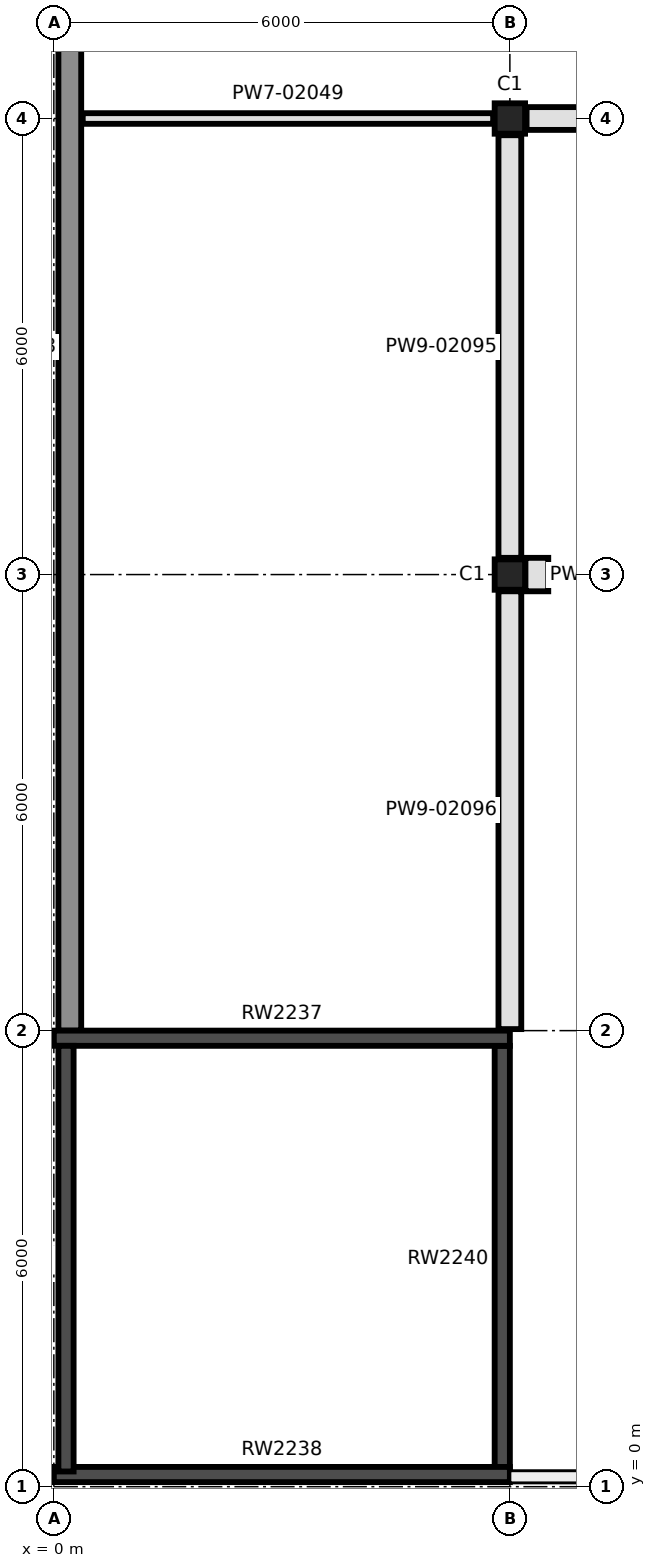
"""IFC4 building model, lengths in metres.
Left out: names, types, materials, properties, quantities, classifications, styles, units other than length and angle.
Written with IfcOpenShell. Run it as: python <this file> out.ifc"""

import sys

from ifc_helpers import new_model, si_unit, direction, frame, frame_2d, origin, origin_2d, place, context, subcontext, project, spatial, rectangle, extrude, element, fill, save


model = new_model("IFC4")
c1 = context("Model", 3, precision=1e-05, world=origin(), true_north=direction((0.0, 1.0)))
c2 = subcontext(c1, "Body", "Model", "MODEL_VIEW")
j1 = project(units=[si_unit("LENGTHUNIT", "METRE"), si_unit("PLANEANGLEUNIT", "RADIAN")], contexts=[c1])
p1 = place(None, origin())
s1 = spatial("IfcSite", under=j1, at=p1, CompositionType="ELEMENT")
p2 = place(p1, origin())
s2 = spatial("IfcBuilding", under=s1, at=p2, CompositionType="ELEMENT")
p3 = place(p2, frame((0.0, 0.0, 12.0)))
s3 = spatial("IfcBuildingStorey", under=s2, at=p3, CompositionType="ELEMENT", Elevation=12.0)
for number, where, z_axis, x_axis in (
    (1, (6.0, 12.0, 0.0), (0.0, 0.0, 1.0), (1.0, 0.0, 0.0)),
    (2, (6.0, 18.0, 0.0), (0.0, 0.0, 1.0), (1.0, 0.0, 0.0)),
):
    element("IfcColumn", number, at=place(p3, frame(where, z_axis=z_axis, x_axis=x_axis)), inside=s3, PredefinedType="COLUMN", context=c2, shape_type="SweptSolid", body=[
        extrude(rectangle(XDim=0.4, YDim=0.4, at=origin_2d()), origin(), (0.0, 0.0, 1.0), 4.5),
    ])
p4 = place(p3, frame((0.0, 5.9, 0.0), z_axis=(0.0, 0.0, 1.0), x_axis=(1.0, 0.0, 0.0)))
e3 = element("IfcWall", 3, at=p4, inside=s3, PredefinedType="SHEAR", context=c2, shape_type="SweptSolid", body=[
    extrude(rectangle(XDim=6.0, YDim=0.2, at=frame_2d((3.0, 0.0))), origin(), (0.0, 0.0, 1.0), 4.5),
])
p5 = place(p4, frame((4.6, 0.0, 0.0)))
e4 = element("IfcOpeningElement", 4, at=p5, cuts=e3, PredefinedType="OPENING", context=c2, shape_type="SweptSolid", body=[
    extrude(rectangle(XDim=1.1, YDim=2.2, at=frame_2d((0.55, 1.1))), frame((0.0, 0.11, 0.0), z_axis=(0.0, -1.0, 0.0), x_axis=(1.0, 0.0, 0.0)), (0.0, 0.0, 1.0), 0.22),
])
p6 = place(p3, frame((0.0, 0.16, 0.0), z_axis=(0.0, 0.0, 1.0), x_axis=(1.0, 0.0, 0.0)))
e5 = element("IfcWall", 5, at=p6, inside=s3, PredefinedType="SHEAR", context=c2, shape_type="SweptSolid", body=[
    extrude(rectangle(XDim=6.0, YDim=0.2, at=frame_2d((3.0, 0.0))), origin(), (0.0, 0.0, 1.0), 4.5),
])
p7 = place(p6, frame((2.75, 0.0, 0.9)))
e6 = element("IfcOpeningElement", 6, at=p7, cuts=e5, PredefinedType="OPENING", context=c2, shape_type="SweptSolid", body=[
    extrude(rectangle(XDim=0.5, YDim=2.1, at=frame_2d((0.25, 1.05))), frame((0.0, 0.11, 0.0), z_axis=(0.0, -1.0, 0.0), x_axis=(1.0, 0.0, 0.0)), (0.0, 0.0, 1.0), 0.22),
])
p8 = place(p3, frame((0.16, 0.2, 0.0), z_axis=(0.0, 0.0, 1.0), x_axis=(0.0, 1.0, 0.0)))
e7 = element("IfcWall", 7, at=p8, inside=s3, PredefinedType="SHEAR", context=c2, shape_type="SweptSolid", body=[
    extrude(rectangle(XDim=5.6, YDim=0.2, at=frame_2d((2.8, 0.0))), origin(), (0.0, 0.0, 1.0), 4.5),
])
p9 = place(p8, frame((2.55, 0.0, 0.9)))
e8 = element("IfcOpeningElement", 8, at=p9, cuts=e7, PredefinedType="OPENING", context=c2, shape_type="SweptSolid", body=[
    extrude(rectangle(XDim=0.5, YDim=2.1, at=frame_2d((0.25, 1.05))), frame((0.0, 0.11, 0.0), z_axis=(0.0, -1.0, 0.0), x_axis=(1.0, 0.0, 0.0)), (0.0, 0.0, 1.0), 0.22),
])
p10 = place(p3, frame((5.9, 0.2, 0.0), z_axis=(0.0, 0.0, 1.0), x_axis=(0.0, 1.0, 0.0)))
e9 = element("IfcWall", 9, at=p10, inside=s3, PredefinedType="SHEAR", context=c2, shape_type="SweptSolid", body=[
    extrude(rectangle(XDim=5.6, YDim=0.2, at=frame_2d((2.8, 0.0))), origin(), (0.0, 0.0, 1.0), 4.5),
])
p11 = place(p3, frame((0.21, 6.0, 0.0), z_axis=(0.0, 0.0, 1.0), x_axis=(0.0, 1.0, 0.0)))
e10 = element("IfcWall", 10, at=p11, inside=s3, PredefinedType="SOLIDWALL", context=c2, shape_type="SweptSolid", body=[
    extrude(rectangle(XDim=18.0, YDim=0.3, at=frame_2d((9.0, 0.0))), origin(), (0.0, 0.0, 1.0), 4.5),
])
p12 = place(p2, frame((0.0, 0.0, 7.0)))
s4 = spatial("IfcBuildingStorey", under=s2, at=p12, CompositionType="ELEMENT", Elevation=7.0)
p13 = place(p12, frame((11.8, 0.375, 0.0), z_axis=(0.0, 0.0, 1.0), x_axis=(-1.0, 0.0, 0.0)))
e11 = element("IfcWall", 11, at=p13, inside=s4, PredefinedType="SOLIDWALL", context=c2, shape_type="SweptSolid", body=[
    extrude(rectangle(XDim=5.8, YDim=0.25, at=frame_2d((2.9, 0.0))), origin(), (0.0, 0.0, 1.0), 8.9),
])
p14 = place(p3, frame((0.38, 18.0, 0.0), z_axis=(0.0, 0.0, 1.0), x_axis=(1.0, 0.0, 0.0)))
e12 = element("IfcWall", 12, at=p14, inside=s3, PredefinedType="PARTITIONING", context=c2, shape_type="SweptSolid", body=[
    extrude(rectangle(XDim=5.4, YDim=0.14, at=frame_2d((2.7, 0.0))), origin(), (0.0, 0.0, 1.0), 4.28),
])
p15 = place(p14, frame((1.67, 0.0, 0.0)))
e13 = element("IfcOpeningElement", 13, at=p15, cuts=e12, PredefinedType="OPENING", context=c2, shape_type="SweptSolid", body=[
    extrude(rectangle(XDim=1.8, YDim=2.1, at=frame_2d((0.9, 1.05))), frame((0.0, 0.08, 0.0), z_axis=(0.0, -1.0, 0.0), x_axis=(1.0, 0.0, 0.0)), (0.0, 0.0, 1.0), 0.16),
])
for number, where, z_axis, x_axis in (
    (14, (6.22, 18.0, 0.0), (0.0, 0.0, 1.0), (1.0, 0.0, 0.0)),
    (15, (6.0, 12.22, 0.0), (0.0, 0.0, 1.0), (0.0, 1.0, 0.0)),
):
    element("IfcWall", number, at=place(p3, frame(where, z_axis=z_axis, x_axis=x_axis)), inside=s3, PredefinedType="PARTITIONING", context=c2, shape_type="SweptSolid", body=[
        extrude(rectangle(XDim=5.56, YDim=0.3, at=frame_2d((2.78, 0.0))), origin(), (0.0, 0.0, 1.0), 3.9),
    ])
p16 = place(p3, frame((6.0, 6.02, 0.0), z_axis=(0.0, 0.0, 1.0), x_axis=(0.0, 1.0, 0.0)))
e16 = element("IfcWall", 16, at=p16, inside=s3, PredefinedType="PARTITIONING", context=c2, shape_type="SweptSolid", body=[
    extrude(rectangle(XDim=5.76, YDim=0.3, at=frame_2d((2.88, 0.0))), origin(), (0.0, 0.0, 1.0), 3.9),
])
p17 = place(p3, frame((6.355, 11.78, 0.0), z_axis=(0.0, 0.0, 1.0), x_axis=(0.0, 1.0, 0.0)))
e17 = element("IfcWall", 17, at=p17, inside=s3, PredefinedType="PARTITIONING", context=c2, shape_type="SweptSolid", body=[
    extrude(rectangle(XDim=0.44, YDim=0.3, at=frame_2d((0.22, 0.0))), origin(), (0.0, 0.0, 1.0), 4.28),
])
p18 = place(p7, origin())
e18 = element("IfcWindow", 18, at=p18, inside=s3, PartitioningType="SINGLE_PANEL", PredefinedType="WINDOW", context=c2, shape_type="SweptSolid", body=[
    extrude(rectangle(XDim=0.5, YDim=2.1, at=frame_2d((0.25, 1.05))), frame((0.0, 0.03, 0.0), z_axis=(0.0, -1.0, 0.0), x_axis=(1.0, 0.0, 0.0)), (0.0, 0.0, 1.0), 0.06),
])
fill(e6, e18)
p19 = place(p9, origin())
e19 = element("IfcWindow", 19, at=p19, inside=s3, PartitioningType="SINGLE_PANEL", PredefinedType="WINDOW", context=c2, shape_type="SweptSolid", body=[
    extrude(rectangle(XDim=0.5, YDim=2.1, at=frame_2d((0.25, 1.05))), frame((0.0, 0.03, 0.0), z_axis=(0.0, -1.0, 0.0), x_axis=(1.0, 0.0, 0.0)), (0.0, 0.0, 1.0), 0.06),
])
fill(e8, e19)
p20 = place(p5, frame((1.1, 0.0, 0.0), z_axis=(0.0, 0.0, 1.0), x_axis=(-1.0, 0.0, 0.0)))
e20 = element("IfcDoor", 20, at=p20, inside=s3, OperationType="SINGLE_SWING_RIGHT", PredefinedType="DOOR", context=c2, shape_type="SweptSolid", body=[
    extrude(rectangle(XDim=1.1, YDim=2.2, at=frame_2d((0.55, 1.1))), frame((0.0, 0.025, 0.0), z_axis=(0.0, -1.0, 0.0), x_axis=(1.0, 0.0, 0.0)), (0.0, 0.0, 1.0), 0.05),
])
fill(e4, e20)
p21 = place(p15, frame((1.8, 0.0, 0.0), z_axis=(0.0, 0.0, 1.0), x_axis=(-1.0, 0.0, 0.0)))
e21 = element("IfcDoor", 21, at=p21, inside=s3, OperationType="DOUBLE_DOOR_SINGLE_SWING", PredefinedType="DOOR", context=c2, shape_type="SweptSolid", body=[
    extrude(rectangle(XDim=1.8, YDim=2.1, at=frame_2d((0.9, 1.05))), frame((0.0, 0.025, 0.0), z_axis=(0.0, -1.0, 0.0), x_axis=(1.0, 0.0, 0.0)), (0.0, 0.0, 1.0), 0.05),
])
fill(e13, e21)
save(model, sys.argv[1])
